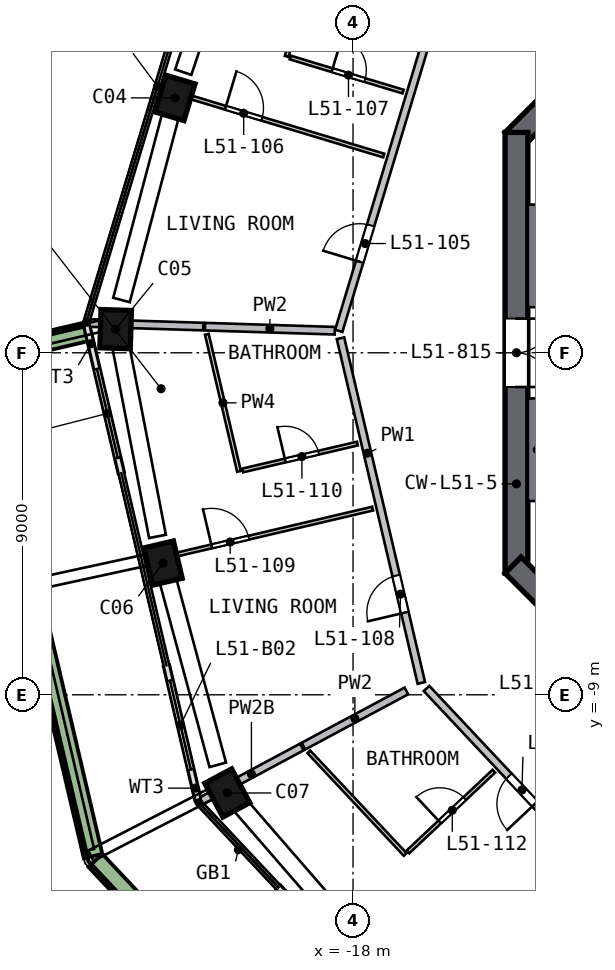
"""IFC4 building model, lengths in metres.
Left out: names, types, materials, properties, quantities, classifications, styles, units other than length and angle.
Written with IfcOpenShell. Run it as: python <this file> out.ifc"""

import sys

from ifc_helpers import new_model, si_unit, direction, frame, frame_2d, origin, origin_2d, place, context, subcontext, project, spatial, polyline, rectangle, outline, extrude, element, fill, save


model = new_model("IFC4")
c1 = context("Model", 3, precision=1e-05, world=origin(), true_north=direction((0.0, 1.0)))
c2 = subcontext(c1, "Body", "Model", "MODEL_VIEW")
j1 = project(units=[si_unit("LENGTHUNIT", "METRE"), si_unit("PLANEANGLEUNIT", "RADIAN")], contexts=[c1])
p1 = place(None, origin())
s1 = spatial("IfcSite", under=j1, at=p1, CompositionType="ELEMENT")
p2 = place(p1, origin())
s2 = spatial("IfcBuilding", under=s1, at=p2, CompositionType="ELEMENT")
p3 = place(p2, frame((0.0, 0.0, 209.0)))
s3 = spatial("IfcBuildingStorey", under=s2, at=p3, CompositionType="ELEMENT", Elevation=209.0)
p4 = place(p3, frame((-22.649, 6.838, 0.0), z_axis=(-0.031560169, -0.107989012, 0.99365101), x_axis=(-0.286821212, -0.951355255, -0.112502316)))
e1 = element("IfcColumn", 1, at=p4, inside=s3, PredefinedType="COLUMN", context=c2, shape_type="SweptSolid", body=[
    extrude(rectangle(XDim=1.0, YDim=0.8, at=origin_2d()), origin(), (0.0, 0.0, 1.0), 3.21),
])
p5 = place(p3, frame((-24.243, 0.762, 0.0), z_axis=(-0.002660825, -0.115327752, 0.99332393), x_axis=(0.031341998, 0.992829822, 0.11535434)))
e2 = element("IfcColumn", 2, at=p5, inside=s3, PredefinedType="COLUMN", context=c2, shape_type="SweptSolid", body=[
    extrude(rectangle(XDim=1.0, YDim=0.8, at=origin_2d()), origin(), (0.0, 0.0, 1.0), 3.211),
])
p6 = place(p3, frame((-23.033, -5.402, 0.0), z_axis=(0.026616878, -0.109357343, 0.99364607), x_axis=(0.226786103, -0.967420011, -0.112545929)))
e3 = element("IfcColumn", 3, at=p6, inside=s3, PredefinedType="COLUMN", context=c2, shape_type="SweptSolid", body=[
    extrude(rectangle(XDim=1.0, YDim=0.8, at=origin_2d()), origin(), (0.0, 0.0, 1.0), 3.21),
])
p7 = place(p3, frame((-21.376, -11.462, 0.0), z_axis=(0.055345312, -0.101187651, 0.993326711), x_axis=(-0.469249686, 0.875501932, 0.115330388)))
e4 = element("IfcColumn", 4, at=p7, inside=s3, PredefinedType="COLUMN", context=c2, shape_type="SweptSolid", body=[
    extrude(rectangle(XDim=1.0, YDim=0.8, at=origin_2d()), origin(), (0.0, 0.0, 1.0), 3.211),
])
p8 = place(p3, frame((-5.587, 13.788, 0.0), z_axis=(0.0, 0.0, 1.0), x_axis=(-0.707106781, -0.707106781, 0.0)))
e5 = element("IfcWall", 5, at=p8, inside=s3, PredefinedType="SHEAR", context=c2, shape_type="SweptSolid", body=[
    extrude(rectangle(XDim=11.598, YDim=0.6, at=frame_2d((5.799, 0.0))), origin(), (0.0, 0.0, 1.0), 3.5),
])
p9 = place(p3, frame((-13.7, 5.799, 0.0), z_axis=(0.0, 0.0, 1.0), x_axis=(0.0, -1.0, 0.0)))
e6 = element("IfcWall", 6, at=p9, inside=s3, PredefinedType="SHEAR", context=c2, shape_type="SweptSolid", body=[
    extrude(rectangle(XDim=11.598, YDim=0.6, at=frame_2d((5.799, 0.0))), origin(), (0.0, 0.0, 1.0), 3.5),
])
p10 = place(p9, frame((4.899, 0.0, 0.0)))
e7 = element("IfcOpeningElement", 7, at=p10, cuts=e6, PredefinedType="OPENING", context=c2, shape_type="SweptSolid", body=[
    extrude(rectangle(XDim=1.8, YDim=2.1, at=frame_2d((0.9, 1.05))), frame((0.0, 0.31, 0.0), z_axis=(0.0, -1.0, 0.0), x_axis=(1.0, 0.0, 0.0)), (0.0, 0.0, 1.0), 0.62),
])
p11 = place(p3, frame((-13.788, -5.587, 0.0), z_axis=(0.0, 0.0, 1.0), x_axis=(0.707106781, -0.707106781, 0.0)))
e8 = element("IfcWall", 8, at=p11, inside=s3, PredefinedType="SHEAR", context=c2, shape_type="SweptSolid", body=[
    extrude(rectangle(XDim=11.598, YDim=0.6, at=frame_2d((5.799, 0.0))), origin(), (0.0, 0.0, 1.0), 3.5),
])
p12 = place(p11, frame((2.099, 0.0, 0.0)))
e9 = element("IfcOpeningElement", 9, at=p12, cuts=e8, PredefinedType="OPENING", context=c2, shape_type="SweptSolid", body=[
    extrude(rectangle(XDim=1.2, YDim=2.1, at=frame_2d((0.6, 1.05))), frame((0.0, 0.31, 0.0), z_axis=(0.0, -1.0, 0.0), x_axis=(1.0, 0.0, 0.0)), (0.0, 0.0, 1.0), 0.62),
])
p13 = place(p3, frame((-25.006, 0.708, 0.0), z_axis=(0.0, 0.0, 1.0), x_axis=(0.228363583, -0.973575921, 0.0)))
e10 = element("IfcWall", 10, at=p13, inside=s3, PredefinedType="SOLIDWALL", context=c2, shape_type="SweptSolid", body=[
    extrude(rectangle(XDim=3.967, YDim=0.15, at=frame_2d((1.984, 0.0))), origin(), (0.0, 0.0, 1.0), 2.475),
])
p14 = place(p13, frame((1.167, 0.0, 0.0)))
e11 = element("IfcOpeningElement", 11, at=p14, cuts=e10, PredefinedType="OPENING", context=c2, shape_type="SweptSolid", body=[
    extrude(rectangle(XDim=2.4, YDim=2.4, at=frame_2d((1.2, 1.2))), frame((0.0, 0.085, 0.0), z_axis=(0.0, -1.0, 0.0), x_axis=(1.0, 0.0, 0.0)), (0.0, 0.0, 1.0), 0.17),
])
p15 = place(p3, frame((-22.907, -8.24, 0.0), z_axis=(0.0, 0.0, 1.0), x_axis=(0.228341634, -0.973581069, 0.0)))
e12 = element("IfcWall", 12, at=p15, inside=s3, PredefinedType="SOLIDWALL", context=c2, shape_type="SweptSolid", body=[
    extrude(rectangle(XDim=3.608, YDim=0.15, at=frame_2d((1.804, 0.0))), origin(), (0.0, 0.0, 1.0), 2.475),
])
p16 = place(p15, frame((0.4, 0.0, 0.0)))
e13 = element("IfcOpeningElement", 13, at=p16, cuts=e12, PredefinedType="OPENING", context=c2, shape_type="SweptSolid", body=[
    extrude(rectangle(XDim=2.4, YDim=2.4, at=frame_2d((1.2, 1.2))), frame((0.0, 0.085, 0.0), z_axis=(0.0, -1.0, 0.0), x_axis=(1.0, 0.0, 0.0)), (0.0, 0.0, 1.0), 0.17),
])
p17 = place(p3, frame((-19.956, -14.076, 0.0), z_axis=(0.0, 0.0, 1.0), x_axis=(0.684533271, -0.728981619, 0.0)))
e14 = element("IfcWall", 14, at=p17, inside=s3, PredefinedType="SOLIDWALL", context=c2, shape_type="SweptSolid", body=[
    extrude(rectangle(XDim=3.4, YDim=0.15, at=frame_2d((1.7, 0.0))), origin(), (0.0, 0.0, 1.0), 2.475),
])
p18 = place(p17, frame((0.4, 0.0, 0.0)))
e15 = element("IfcOpeningElement", 15, at=p18, cuts=e14, PredefinedType="OPENING", context=c2, shape_type="SweptSolid", body=[
    extrude(rectangle(XDim=2.4, YDim=2.4, at=frame_2d((1.2, 1.2))), frame((0.0, 0.085, 0.0), z_axis=(0.0, -1.0, 0.0), x_axis=(1.0, 0.0, 0.0)), (0.0, 0.0, 1.0), 0.17),
])
p19 = place(p3, frame((-25.046, 0.545, 0.0), z_axis=(0.0, 0.0, 1.0), x_axis=(-0.973581063, -0.228341659, 0.0)))
e16 = element("IfcWall", 16, at=p19, inside=s3, PredefinedType="SOLIDWALL", context=c2, shape_type="SweptSolid", body=[
    extrude(rectangle(XDim=3.199, YDim=0.5, at=frame_2d((1.6, 0.0))), origin(), (0.0, 0.0, 1.0), 0.7),
])
p20 = place(p3, frame((-27.86, -0.372, 0.0), z_axis=(0.0, 0.0, 1.0), x_axis=(0.228347739, -0.973579637, 0.0)))
e17 = element("IfcWall", 17, at=p20, inside=s3, PredefinedType="SOLIDWALL", context=c2, shape_type="SweptSolid", body=[
    extrude(rectangle(XDim=13.223, YDim=0.5, at=frame_2d((6.612, 0.0))), origin(), (0.0, 0.0, 1.0), 0.7),
])
p21 = place(p3, frame((-24.779, -13.36, 0.0), z_axis=(0.0, 0.0, 1.0), x_axis=(0.68453799, -0.728977188, 0.0)))
e18 = element("IfcWall", 18, at=p21, inside=s3, PredefinedType="SOLIDWALL", context=c2, shape_type="SweptSolid", body=[
    extrude(rectangle(XDim=13.724, YDim=0.5, at=frame_2d((6.862, 0.0))), origin(), (0.0, 0.0, 1.0), 0.7),
])
p22 = place(p3, origin())
e19 = element("IfcWall", 19, at=p22, inside=s3, PredefinedType="SOLIDWALL", context=c2, shape_type="SweptSolid", body=[
    extrude(outline(polyline([(-13.4, 3.9), (-9.9, 3.9), (-9.9, 3.7), (-12.9, 3.7), (-12.9, 1.4), (-9.9, 1.4), (-9.9, 1.2), (-13.4, 1.2), (-13.4, 3.9)])), origin(), (0.0, 0.0, 1.0), 3.19),
])
p23 = place(p3, origin())
e20 = element("IfcWall", 20, at=p23, inside=s3, PredefinedType="SOLIDWALL", context=c2, shape_type="SweptSolid", body=[
    extrude(outline(polyline([(-13.4, -3.9), (-13.4, -1.2), (-9.9, -1.2), (-9.9, -1.4), (-12.9, -1.4), (-12.9, -3.7), (-9.9, -3.7), (-9.9, -3.9), (-13.4, -3.9)])), origin(), (0.0, 0.0, 1.0), 3.19),
])
p24 = place(p3, frame((-16.203, -8.688, 0.0), z_axis=(0.0, 0.0, 1.0), x_axis=(-0.228346959, 0.97357982, 0.0)))
e21 = element("IfcWall", 21, at=p24, inside=s3, PredefinedType="SOLIDWALL", context=c2, shape_type="SweptSolid", body=[
    extrude(rectangle(XDim=9.317, YDim=0.2, at=frame_2d((4.658, 0.0))), origin(), (0.0, 0.0, 1.0), 3.19),
])
p25 = place(p24, frame((1.9, 0.0, 0.0)))
e22 = element("IfcOpeningElement", 22, at=p25, cuts=e21, PredefinedType="OPENING", context=c2, shape_type="SweptSolid", body=[
    extrude(rectangle(XDim=1.0, YDim=2.1, at=frame_2d((0.5, 1.05))), frame((0.0, 0.11, 0.0), z_axis=(0.0, -1.0, 0.0), x_axis=(1.0, 0.0, 0.0)), (0.0, 0.0, 1.0), 0.22),
])
p26 = place(p3, frame((-18.376, 0.577, 0.0), z_axis=(0.0, 0.0, 1.0), x_axis=(0.289039636, 0.957317131, 0.0)))
e23 = element("IfcWall", 23, at=p26, inside=s3, PredefinedType="SOLIDWALL", context=c2, shape_type="SweptSolid", body=[
    extrude(rectangle(XDim=9.517, YDim=0.2, at=frame_2d((4.758, 0.0))), origin(), (0.0, 0.0, 1.0), 3.19),
])
p27 = place(p26, frame((1.9, 0.0, 0.0)))
e24 = element("IfcOpeningElement", 24, at=p27, cuts=e23, PredefinedType="OPENING", context=c2, shape_type="SweptSolid", body=[
    extrude(rectangle(XDim=1.0, YDim=2.1, at=frame_2d((0.5, 1.05))), frame((0.0, 0.11, 0.0), z_axis=(0.0, -1.0, 0.0), x_axis=(1.0, 0.0, 0.0)), (0.0, 0.0, 1.0), 0.22),
])
p28 = place(p3, frame((-9.688, -15.625, 0.0), z_axis=(0.0, 0.0, 1.0), x_axis=(-0.684549323, 0.728966545, 0.0)))
e25 = element("IfcWall", 25, at=p28, inside=s3, PredefinedType="SOLIDWALL", context=c2, shape_type="SweptSolid", body=[
    extrude(rectangle(XDim=9.317, YDim=0.2, at=frame_2d((4.658, 0.0))), origin(), (0.0, 0.0, 1.0), 3.19),
])
p29 = place(p28, frame((5.15, 0.0, 0.0)))
e26 = element("IfcOpeningElement", 26, at=p29, cuts=e25, PredefinedType="OPENING", context=c2, shape_type="SweptSolid", body=[
    extrude(rectangle(XDim=1.0, YDim=2.1, at=frame_2d((0.5, 1.05))), frame((0.0, 0.11, 0.0), z_axis=(0.0, -1.0, 0.0), x_axis=(1.0, 0.0, 0.0)), (0.0, 0.0, 1.0), 0.22),
])
p30 = place(p3, frame((-21.942, 0.689, 0.0), z_axis=(0.0, 0.0, 1.0), x_axis=(-0.999505171, 0.031454944, 0.0)))
e27 = element("IfcWall", 27, at=p30, inside=s3, PredefinedType="SOLIDWALL", context=c2, shape_type="SweptSolid", body=[
    extrude(rectangle(XDim=3.011, YDim=0.2, at=frame_2d((1.506, 0.0))), origin(), (0.0, 0.0, 1.0), 3.19),
])
p31 = place(p3, frame((-19.347, -10.374, 0.0), z_axis=(0.0, 0.0, 1.0), x_axis=(-0.881302745, -0.472552084, 0.0)))
e28 = element("IfcWall", 28, at=p31, inside=s3, PredefinedType="SOLIDWALL", context=c2, shape_type="SweptSolid", body=[
    extrude(rectangle(XDim=3.011, YDim=0.2, at=frame_2d((1.506, 0.0))), origin(), (0.0, 0.0, 1.0), 2.69),
])
p32 = place(p3, frame((-18.479, 0.581, 0.0), z_axis=(0.0, 0.0, 1.0), x_axis=(-0.999508376, 0.031352924, 0.0)))
e29 = element("IfcWall", 29, at=p32, inside=s3, PredefinedType="SOLIDWALL", context=c2, shape_type="SweptSolid", body=[
    extrude(rectangle(XDim=3.418, YDim=0.2, at=frame_2d((1.709, 0.0))), origin(), (0.0, 0.0, 1.0), 3.19),
])
p33 = place(p3, frame((-16.597, -8.899, 0.0), z_axis=(0.0, 0.0, 1.0), x_axis=(-0.88131111, -0.472536482, 0.0)))
e30 = element("IfcWall", 30, at=p33, inside=s3, PredefinedType="SOLIDWALL", context=c2, shape_type="SweptSolid", body=[
    extrude(rectangle(XDim=3.075, YDim=0.2, at=frame_2d((1.537, 0.0))), origin(), (0.0, 0.0, 1.0), 3.19),
])
p34 = place(p3, frame((-21.847, 0.487, 0.0), z_axis=(0.0, 0.0, 1.0), x_axis=(0.228381684, -0.973571675, 0.0)))
e31 = element("IfcWall", 31, at=p34, inside=s3, PredefinedType="PARTITIONING", context=c2, shape_type="SweptSolid", body=[
    extrude(rectangle(XDim=3.704, YDim=0.1, at=frame_2d((1.852, 0.0))), origin(), (0.0, 0.0, 1.0), 3.19),
])
p35 = place(p3, frame((-23.471, -5.505, 0.0), z_axis=(0.0, 0.0, 1.0), x_axis=(0.973581434, 0.228340078, 0.0)))
e32 = element("IfcWall", 32, at=p35, inside=s3, PredefinedType="PARTITIONING", context=c2, shape_type="SweptSolid", body=[
    extrude(rectangle(XDim=6.15, YDim=0.1, at=frame_2d((3.075, 0.0))), origin(), (0.0, 0.0, 1.0), 3.19),
])
p36 = place(p35, frame((1.8, 0.0, 0.0)))
e33 = element("IfcOpeningElement", 33, at=p36, cuts=e32, PredefinedType="OPENING", context=c2, shape_type="SweptSolid", body=[
    extrude(rectangle(XDim=1.0, YDim=2.1, at=frame_2d((0.5, 1.05))), frame((0.0, 0.06, 0.0), z_axis=(0.0, -1.0, 0.0), x_axis=(1.0, 0.0, 0.0)), (0.0, 0.0, 1.0), 0.12),
])
p37 = place(p3, frame((-23.079, 6.968, 0.0), z_axis=(0.0, 0.0, 1.0), x_axis=(0.957316727, -0.289040974, 0.0)))
e34 = element("IfcWall", 34, at=p37, inside=s3, PredefinedType="PARTITIONING", context=c2, shape_type="SweptSolid", body=[
    extrude(rectangle(XDim=6.15, YDim=0.1, at=frame_2d((3.075, 0.0))), origin(), (0.0, 0.0, 1.0), 3.19),
])
p38 = place(p37, frame((1.8, 0.0, 0.0)))
e35 = element("IfcOpeningElement", 35, at=p38, cuts=e34, PredefinedType="OPENING", context=c2, shape_type="SweptSolid", body=[
    extrude(rectangle(XDim=1.0, YDim=2.1, at=frame_2d((0.5, 1.05))), frame((0.0, 0.06, 0.0), z_axis=(0.0, -1.0, 0.0), x_axis=(1.0, 0.0, 0.0)), (0.0, 0.0, 1.0), 0.12),
])
p39 = place(p3, frame((-20.904, -3.097, 0.0), z_axis=(0.0, 0.0, 1.0), x_axis=(0.973587323, 0.228314969, 0.0)))
e36 = element("IfcWall", 36, at=p39, inside=s3, PredefinedType="PARTITIONING", context=c2, shape_type="SweptSolid", body=[
    extrude(rectangle(XDim=3.1, YDim=0.1, at=frame_2d((1.55, 0.0))), origin(), (0.0, 0.0, 1.0), 3.19),
])
p40 = place(p39, frame((1.15, 0.0, 0.0)))
e37 = element("IfcOpeningElement", 37, at=p40, cuts=e36, PredefinedType="OPENING", context=c2, shape_type="SweptSolid", body=[
    extrude(rectangle(XDim=0.9, YDim=2.1, at=frame_2d((0.45, 1.05))), frame((0.0, 0.06, 0.0), z_axis=(0.0, -1.0, 0.0), x_axis=(1.0, 0.0, 0.0)), (0.0, 0.0, 1.0), 0.12),
])
p41 = place(p3, frame((-18.677, 11.344, 0.0), z_axis=(0.0, 0.0, 1.0), x_axis=(-0.289028527, -0.957320485, 0.0)))
e38 = element("IfcWall", 38, at=p41, inside=s3, PredefinedType="PARTITIONING", context=c2, shape_type="SweptSolid", body=[
    extrude(rectangle(XDim=3.704, YDim=0.1, at=frame_2d((1.852, 0.0))), origin(), (0.0, 0.0, 1.0), 3.19),
])
p42 = place(p3, frame((-19.651, 7.77, 0.0), z_axis=(0.0, 0.0, 1.0), x_axis=(0.957321955, -0.289023657, 0.0)))
e39 = element("IfcWall", 39, at=p42, inside=s3, PredefinedType="PARTITIONING", context=c2, shape_type="SweptSolid", body=[
    extrude(rectangle(XDim=3.1, YDim=0.1, at=frame_2d((1.55, 0.0))), origin(), (0.0, 0.0, 1.0), 3.19),
])
p43 = place(p42, frame((1.15, 0.0, 0.0)))
e40 = element("IfcOpeningElement", 40, at=p43, cuts=e39, PredefinedType="OPENING", context=c2, shape_type="SweptSolid", body=[
    extrude(rectangle(XDim=0.9, YDim=2.1, at=frame_2d((0.45, 1.05))), frame((0.0, 0.06, 0.0), z_axis=(0.0, -1.0, 0.0), x_axis=(1.0, 0.0, 0.0)), (0.0, 0.0, 1.0), 0.12),
])
p44 = place(p3, frame((-16.627, -13.202, 0.0), z_axis=(0.0, 0.0, 1.0), x_axis=(-0.684546009, 0.728969657, 0.0)))
e41 = element("IfcWall", 41, at=p44, inside=s3, PredefinedType="PARTITIONING", context=c2, shape_type="SweptSolid", body=[
    extrude(rectangle(XDim=3.704, YDim=0.1, at=frame_2d((1.852, 0.0))), origin(), (0.0, 0.0, 1.0), 3.19),
])
p45 = place(p3, frame((-16.554, -13.134, 0.0), z_axis=(0.0, 0.0, 1.0), x_axis=(0.728967156, 0.684548673, 0.0)))
e42 = element("IfcWall", 42, at=p45, inside=s3, PredefinedType="PARTITIONING", context=c2, shape_type="SweptSolid", body=[
    extrude(rectangle(XDim=3.1, YDim=0.1, at=frame_2d((1.55, 0.0))), origin(), (0.0, 0.0, 1.0), 3.19),
])
p46 = place(p45, frame((1.15, 0.0, 0.0)))
e43 = element("IfcOpeningElement", 43, at=p46, cuts=e42, PredefinedType="OPENING", context=c2, shape_type="SweptSolid", body=[
    extrude(rectangle(XDim=0.9, YDim=2.1, at=frame_2d((0.45, 1.05))), frame((0.0, 0.06, 0.0), z_axis=(0.0, -1.0, 0.0), x_axis=(1.0, 0.0, 0.0)), (0.0, 0.0, 1.0), 0.12),
])
p47 = place(p14, origin())
e44 = element("IfcDoor", 44, at=p47, inside=s3, OperationType="SLIDING_TO_LEFT", PredefinedType="DOOR", context=c2, shape_type="SweptSolid", body=[
    extrude(rectangle(XDim=2.4, YDim=2.4, at=frame_2d((1.2, 1.2))), frame((0.0, 0.025, 0.0), z_axis=(0.0, -1.0, 0.0), x_axis=(1.0, 0.0, 0.0)), (0.0, 0.0, 1.0), 0.05),
])
fill(e11, e44)
p48 = place(p16, origin())
e45 = element("IfcDoor", 45, at=p48, inside=s3, OperationType="SLIDING_TO_RIGHT", PredefinedType="DOOR", context=c2, shape_type="SweptSolid", body=[
    extrude(rectangle(XDim=2.4, YDim=2.4, at=frame_2d((1.2, 1.2))), frame((0.0, 0.025, 0.0), z_axis=(0.0, -1.0, 0.0), x_axis=(1.0, 0.0, 0.0)), (0.0, 0.0, 1.0), 0.05),
])
fill(e13, e45)
p49 = place(p10, origin())
e46 = element("IfcDoor", 46, at=p49, inside=s3, OperationType="DOUBLE_DOOR_SINGLE_SWING", PredefinedType="DOOR", context=c2, shape_type="SweptSolid", body=[
    extrude(rectangle(XDim=1.8, YDim=2.1, at=frame_2d((0.9, 1.05))), frame((0.0, 0.025, 0.0), z_axis=(0.0, -1.0, 0.0), x_axis=(1.0, 0.0, 0.0)), (0.0, 0.0, 1.0), 0.05),
])
fill(e7, e46)
p50 = place(p27, origin())
e47 = element("IfcDoor", 47, at=p50, inside=s3, OperationType="SINGLE_SWING_LEFT", PredefinedType="DOOR", context=c2, shape_type="SweptSolid", body=[
    extrude(rectangle(XDim=1.0, YDim=2.1, at=frame_2d((0.5, 1.05))), frame((0.0, 0.025, 0.0), z_axis=(0.0, -1.0, 0.0), x_axis=(1.0, 0.0, 0.0)), (0.0, 0.0, 1.0), 0.05),
])
fill(e24, e47)
p51 = place(p38, origin())
e48 = element("IfcDoor", 48, at=p51, inside=s3, OperationType="SINGLE_SWING_LEFT", PredefinedType="DOOR", context=c2, shape_type="SweptSolid", body=[
    extrude(rectangle(XDim=1.0, YDim=2.1, at=frame_2d((0.5, 1.05))), frame((0.0, 0.025, 0.0), z_axis=(0.0, -1.0, 0.0), x_axis=(1.0, 0.0, 0.0)), (0.0, 0.0, 1.0), 0.05),
])
fill(e35, e48)
p52 = place(p43, origin())
e49 = element("IfcDoor", 49, at=p52, inside=s3, OperationType="SINGLE_SWING_LEFT", PredefinedType="DOOR", context=c2, shape_type="SweptSolid", body=[
    extrude(rectangle(XDim=0.9, YDim=2.1, at=frame_2d((0.45, 1.05))), frame((0.0, 0.025, 0.0), z_axis=(0.0, -1.0, 0.0), x_axis=(1.0, 0.0, 0.0)), (0.0, 0.0, 1.0), 0.05),
])
fill(e40, e49)
p53 = place(p25, origin())
e50 = element("IfcDoor", 50, at=p53, inside=s3, OperationType="SINGLE_SWING_LEFT", PredefinedType="DOOR", context=c2, shape_type="SweptSolid", body=[
    extrude(rectangle(XDim=1.0, YDim=2.1, at=frame_2d((0.5, 1.05))), frame((0.0, 0.025, 0.0), z_axis=(0.0, -1.0, 0.0), x_axis=(1.0, 0.0, 0.0)), (0.0, 0.0, 1.0), 0.05),
])
fill(e22, e50)
p54 = place(p36, origin())
e51 = element("IfcDoor", 51, at=p54, inside=s3, OperationType="SINGLE_SWING_LEFT", PredefinedType="DOOR", context=c2, shape_type="SweptSolid", body=[
    extrude(rectangle(XDim=1.0, YDim=2.1, at=frame_2d((0.5, 1.05))), frame((0.0, 0.025, 0.0), z_axis=(0.0, -1.0, 0.0), x_axis=(1.0, 0.0, 0.0)), (0.0, 0.0, 1.0), 0.05),
])
fill(e33, e51)
p55 = place(p40, origin())
e52 = element("IfcDoor", 52, at=p55, inside=s3, OperationType="SINGLE_SWING_LEFT", PredefinedType="DOOR", context=c2, shape_type="SweptSolid", body=[
    extrude(rectangle(XDim=0.9, YDim=2.1, at=frame_2d((0.45, 1.05))), frame((0.0, 0.025, 0.0), z_axis=(0.0, -1.0, 0.0), x_axis=(1.0, 0.0, 0.0)), (0.0, 0.0, 1.0), 0.05),
])
fill(e37, e52)
p56 = place(p29, origin())
e53 = element("IfcDoor", 53, at=p56, inside=s3, OperationType="SINGLE_SWING_LEFT", PredefinedType="DOOR", context=c2, shape_type="SweptSolid", body=[
    extrude(rectangle(XDim=1.0, YDim=2.1, at=frame_2d((0.5, 1.05))), frame((0.0, 0.025, 0.0), z_axis=(0.0, -1.0, 0.0), x_axis=(1.0, 0.0, 0.0)), (0.0, 0.0, 1.0), 0.05),
])
fill(e26, e53)
p57 = place(p46, origin())
e54 = element("IfcDoor", 54, at=p57, inside=s3, OperationType="SINGLE_SWING_LEFT", PredefinedType="DOOR", context=c2, shape_type="SweptSolid", body=[
    extrude(rectangle(XDim=0.9, YDim=2.1, at=frame_2d((0.45, 1.05))), frame((0.0, 0.025, 0.0), z_axis=(0.0, -1.0, 0.0), x_axis=(1.0, 0.0, 0.0)), (0.0, 0.0, 1.0), 0.05),
])
fill(e43, e54)
save(model, sys.argv[1])
